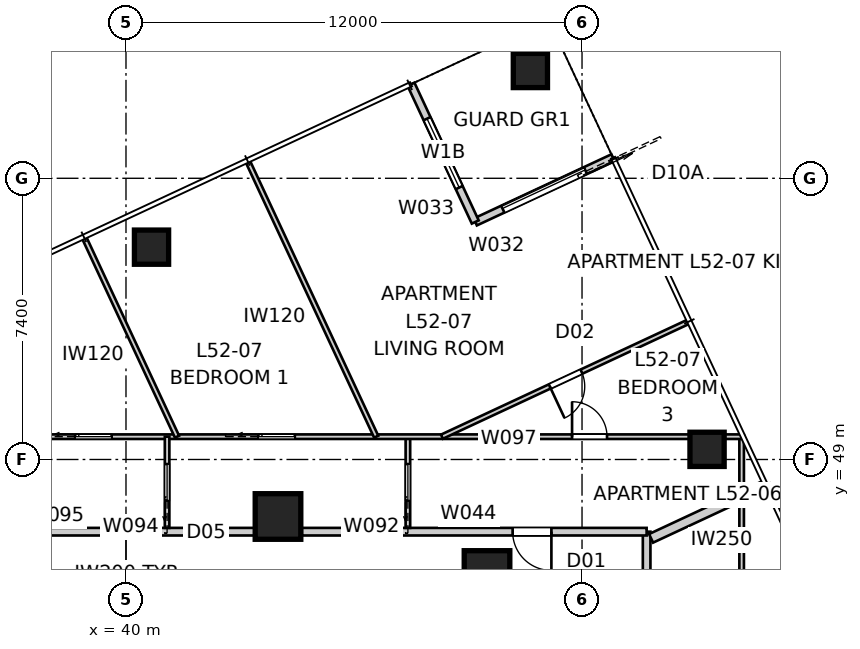
"""IFC4 building model, lengths in metres.
Left out: names, types, materials, properties, quantities, classifications, styles, units other than length and angle.
Written with IfcOpenShell. Run it as: python <this file> out.ifc"""

import sys

from ifc_helpers import new_model, si_unit, direction, frame, frame_2d, origin, origin_2d, place, context, subcontext, project, spatial, rectangle, extrude, element, fill, save


model = new_model("IFC4")
c1 = context("Model", 3, precision=1e-05, world=origin(), true_north=direction((0.0, 1.0)))
c2 = subcontext(c1, "Body", "Model", "MODEL_VIEW")
j1 = project(units=[si_unit("LENGTHUNIT", "METRE"), si_unit("PLANEANGLEUNIT", "RADIAN")], contexts=[c1])
p1 = place(None, origin())
s1 = spatial("IfcSite", under=j1, at=p1, CompositionType="ELEMENT")
p2 = place(p1, origin())
s2 = spatial("IfcBuilding", under=s1, at=p2, CompositionType="ELEMENT")
p3 = place(p2, frame((0.0, 0.0, 189.6)))
s3 = spatial("IfcBuildingStorey", under=s2, at=p3, CompositionType="ELEMENT", Elevation=189.6)
for number, where, z_axis, x_axis in (
    (1, (55.29, 49.267, 0.0), (0.0, 0.0, 1.0), (1.0, 0.0, 0.0)),
    (2, (50.641, 59.236, 0.0), (0.0, 0.0, 1.0), (1.0, 0.0, 0.0)),
    (3, (40.672, 54.588, 0.0), (0.0, 0.0, 1.0), (1.0, 0.0, 0.0)),
):
    element("IfcColumn", number, at=place(p3, frame(where, z_axis=z_axis, x_axis=x_axis)), inside=s3, PredefinedType="COLUMN", context=c2, shape_type="SweptSolid", body=[
        extrude(rectangle(XDim=0.9, YDim=0.9, at=origin_2d()), origin(), (0.0, 0.0, 1.0), 3.4),
    ])
for number, where, z_axis, x_axis in (
    (4, (49.5, 46.0, 0.0), (0.0, 0.0, 1.0), (1.0, 0.0, 0.0)),
    (5, (44.0, 47.5, 0.0), (0.0, 0.0, 1.0), (1.0, 0.0, 0.0)),
):
    element("IfcColumn", number, at=place(p3, frame(where, z_axis=z_axis, x_axis=x_axis)), inside=s3, PredefinedType="COLUMN", context=c2, shape_type="SweptSolid", body=[
        extrude(rectangle(XDim=1.2, YDim=1.2, at=origin_2d()), origin(), (0.0, 0.0, 1.0), 3.4),
    ])
p4 = place(p3, frame((52.815, 56.94, 0.0), z_axis=(0.0, 0.0, 1.0), x_axis=(-0.906289140828, -0.422658246362, 0.0)))
e6 = element("IfcWall", 6, at=p4, inside=s3, PredefinedType="SOLIDWALL", context=c2, shape_type="SweptSolid", body=[
    extrude(rectangle(XDim=4.0, YDim=0.2, at=frame_2d((2.0, 0.0))), origin(), (0.0, 0.0, 1.0), 3.25),
])
p5 = place(p4, frame((0.8, 0.0, 0.0)))
e7 = element("IfcOpeningElement", 7, at=p5, cuts=e6, PredefinedType="OPENING", context=c2, shape_type="SweptSolid", body=[
    extrude(rectangle(XDim=2.4, YDim=2.1, at=frame_2d((1.2, 1.05))), frame((0.0, 0.11, 0.0), z_axis=(0.0, -1.0, 0.0), x_axis=(1.0, 0.0, 0.0)), (0.0, 0.0, 1.0), 0.22),
])
p6 = place(p3, frame((49.19, 55.25, 0.0), z_axis=(0.0, 0.0, 1.0), x_axis=(-0.422658246362, 0.906289140828, 0.0)))
e8 = element("IfcWall", 8, at=p6, inside=s3, PredefinedType="SOLIDWALL", context=c2, shape_type="SweptSolid", body=[
    extrude(rectangle(XDim=4.0, YDim=0.2, at=frame_2d((2.0, 0.0))), origin(), (0.0, 0.0, 1.0), 3.25),
])
p7 = place(p6, frame((1.0, 0.0, 0.45)))
e9 = element("IfcOpeningElement", 9, at=p7, cuts=e8, PredefinedType="OPENING", context=c2, shape_type="SweptSolid", body=[
    extrude(rectangle(XDim=2.0, YDim=1.8, at=frame_2d((1.0, 0.9))), frame((0.0, 0.11, 0.0), z_axis=(0.0, -1.0, 0.0), x_axis=(1.0, 0.0, 0.0)), (0.0, 0.0, 1.0), 0.22),
])
p8 = place(p3, frame((53.7, 13.3, 0.0), z_axis=(0.0, 0.0, 1.0), x_axis=(0.0, 1.0, 0.0)))
e10 = element("IfcWall", 10, at=p8, inside=s3, PredefinedType="PARTITIONING", context=c2, shape_type="SweptSolid", body=[
    extrude(rectangle(XDim=33.8, YDim=0.2, at=frame_2d((16.9, 0.0))), origin(), (0.0, 0.0, 1.0), 3.25),
])
p9 = place(p8, frame((6.984, 0.0, 0.0)))
e11 = element("IfcOpeningElement", 11, at=p9, cuts=e10, PredefinedType="OPENING", context=c2, shape_type="SweptSolid", body=[
    extrude(rectangle(XDim=1.02, YDim=2.34, at=frame_2d((0.51, 1.17))), frame((0.0, 0.11, 0.0), z_axis=(0.0, -1.0, 0.0), x_axis=(1.0, 0.0, 0.0)), (0.0, 0.0, 1.0), 0.22),
])
p10 = place(p8, frame((29.648, 0.0, 0.0)))
e12 = element("IfcOpeningElement", 12, at=p10, cuts=e10, PredefinedType="OPENING", context=c2, shape_type="SweptSolid", body=[
    extrude(rectangle(XDim=1.02, YDim=2.34, at=frame_2d((0.51, 1.17))), frame((0.0, 0.11, 0.0), z_axis=(0.0, -1.0, 0.0), x_axis=(1.0, 0.0, 0.0)), (0.0, 0.0, 1.0), 0.22),
])
p11 = place(p8, frame((15.16, 0.0, 0.0)))
e13 = element("IfcOpeningElement", 13, at=p11, cuts=e10, PredefinedType="OPENING", context=c2, shape_type="SweptSolid", body=[
    extrude(rectangle(XDim=1.02, YDim=2.34, at=frame_2d((0.51, 1.17))), frame((0.0, 0.11, 0.0), z_axis=(0.0, -1.0, 0.0), x_axis=(1.0, 0.0, 0.0)), (0.0, 0.0, 1.0), 0.22),
])
p12 = place(p3, frame((53.7, 47.1, 0.0), z_axis=(0.0, 0.0, 1.0), x_axis=(-1.0, 0.0, 0.0)))
e14 = element("IfcWall", 14, at=p12, inside=s3, PredefinedType="PARTITIONING", context=c2, shape_type="SweptSolid", body=[
    extrude(rectangle(XDim=7.392, YDim=0.2, at=frame_2d((3.696, 0.0))), origin(), (0.0, 0.0, 1.0), 3.25),
])
p13 = place(p12, frame((2.506, 0.0, 0.0)))
e15 = element("IfcOpeningElement", 15, at=p13, cuts=e14, PredefinedType="OPENING", context=c2, shape_type="SweptSolid", body=[
    extrude(rectangle(XDim=1.02, YDim=2.34, at=frame_2d((0.51, 1.17))), frame((0.0, 0.11, 0.0), z_axis=(0.0, -1.0, 0.0), x_axis=(1.0, 0.0, 0.0)), (0.0, 0.0, 1.0), 0.22),
])
p14 = place(p3, frame((46.308, 47.1, 0.0), z_axis=(0.0, 0.0, 1.0), x_axis=(-1.0, 0.0, 0.0)))
e16 = element("IfcWall", 16, at=p14, inside=s3, PredefinedType="PARTITIONING", context=c2, shape_type="SweptSolid", body=[
    extrude(rectangle(XDim=1.683, YDim=0.2, at=frame_2d((0.842, 0.0))), origin(), (0.0, 0.0, 1.0), 2.55),
])
p15 = place(p3, frame((44.625, 47.1, 0.0), z_axis=(0.0, 0.0, 1.0), x_axis=(-1.0, 0.0, 0.0)))
e17 = element("IfcWall", 17, at=p15, inside=s3, PredefinedType="PARTITIONING", context=c2, shape_type="SweptSolid", body=[
    extrude(rectangle(XDim=9.25, YDim=0.2, at=frame_2d((4.625, 0.0))), origin(), (0.0, 0.0, 1.0), 3.25),
])
p16 = place(p3, frame((56.83, 48.33, 0.0), z_axis=(0.0, 0.0, 1.0), x_axis=(-0.906310647924, -0.422612126495, 0.0)))
e18 = element("IfcWall", 18, at=p16, inside=s3, PredefinedType="PARTITIONING", context=c2, shape_type="SweptSolid", body=[
    extrude(rectangle(XDim=3.325, YDim=0.25, at=frame_2d((1.663, 0.0))), origin(), (0.0, 0.0, 1.0), 3.25),
])
p17 = place(p3, frame((56.2, 49.642, 0.0), z_axis=(0.0, 0.0, 1.0), x_axis=(0.0, -1.0, 0.0)))
e19 = element("IfcWall", 19, at=p17, inside=s3, PredefinedType="PARTITIONING", context=c2, shape_type="SweptSolid", body=[
    extrude(rectangle(XDim=37.421, YDim=0.12, at=frame_2d((18.71, 0.0))), origin(), (0.0, 0.0, 1.0), 2.55),
])
p18 = place(p17, frame((27.488, 0.0, 0.0)))
e20 = element("IfcOpeningElement", 20, at=p18, cuts=e19, PredefinedType="OPENING", context=c2, shape_type="SweptSolid", body=[
    extrude(rectangle(XDim=0.92, YDim=2.34, at=frame_2d((0.46, 1.17))), frame((0.0, 0.07, 0.0), z_axis=(0.0, -1.0, 0.0), x_axis=(1.0, 0.0, 0.0)), (0.0, 0.0, 1.0), 0.14),
])
p19 = place(p17, frame((5.08, 0.0, 0.0)))
e21 = element("IfcOpeningElement", 21, at=p19, cuts=e19, PredefinedType="OPENING", context=c2, shape_type="SweptSolid", body=[
    extrude(rectangle(XDim=0.92, YDim=2.34, at=frame_2d((0.46, 1.17))), frame((0.0, 0.07, 0.0), z_axis=(0.0, -1.0, 0.0), x_axis=(1.0, 0.0, 0.0)), (0.0, 0.0, 1.0), 0.14),
])
p20 = place(p17, frame((19.592, 0.0, 0.0)))
e22 = element("IfcOpeningElement", 22, at=p20, cuts=e19, PredefinedType="OPENING", context=c2, shape_type="SweptSolid", body=[
    extrude(rectangle(XDim=0.92, YDim=2.34, at=frame_2d((0.46, 1.17))), frame((0.0, 0.07, 0.0), z_axis=(0.0, -1.0, 0.0), x_axis=(1.0, 0.0, 0.0)), (0.0, 0.0, 1.0), 0.14),
])
p21 = place(p3, frame((47.418, 47.2, 0.0), z_axis=(0.0, 0.0, 1.0), x_axis=(0.0, 1.0, 0.0)))
e23 = element("IfcWall", 23, at=p21, inside=s3, PredefinedType="PARTITIONING", context=c2, shape_type="SweptSolid", body=[
    extrude(rectangle(XDim=2.4, YDim=0.12, at=frame_2d((1.2, 0.0))), origin(), (0.0, 0.0, 1.0), 3.25),
])
p22 = place(p21, frame((0.72, 0.0, 0.0)))
e24 = element("IfcOpeningElement", 24, at=p22, cuts=e23, PredefinedType="OPENING", context=c2, shape_type="SweptSolid", body=[
    extrude(rectangle(XDim=0.96, YDim=2.1, at=frame_2d((0.48, 1.05))), frame((0.0, 0.07, 0.0), z_axis=(0.0, -1.0, 0.0), x_axis=(1.0, 0.0, 0.0)), (0.0, 0.0, 1.0), 0.14),
])
p23 = place(p3, frame((30.86, 49.6, 0.0), z_axis=(0.0, 0.0, 1.0), x_axis=(1.0, 0.0, 0.0)))
e25 = element("IfcWall", 25, at=p23, inside=s3, PredefinedType="PARTITIONING", context=c2, shape_type="SweptSolid", body=[
    extrude(rectangle(XDim=25.333, YDim=0.12, at=frame_2d((12.667, 0.0))), origin(), (0.0, 0.0, 1.0), 3.25),
])
p24 = place(p23, frame((20.877, 0.0, 0.0)))
e26 = element("IfcOpeningElement", 26, at=p24, cuts=e25, PredefinedType="OPENING", context=c2, shape_type="SweptSolid", body=[
    extrude(rectangle(XDim=0.92, YDim=2.34, at=frame_2d((0.46, 1.17))), frame((0.0, 0.07, 0.0), z_axis=(0.0, -1.0, 0.0), x_axis=(1.0, 0.0, 0.0)), (0.0, 0.0, 1.0), 0.14),
])
p25 = place(p23, frame((12.623, 0.0, 0.0)))
e27 = element("IfcOpeningElement", 27, at=p25, cuts=e25, PredefinedType="OPENING", context=c2, shape_type="SweptSolid", body=[
    extrude(rectangle(XDim=0.96, YDim=2.1, at=frame_2d((0.48, 1.05))), frame((0.0, 0.07, 0.0), z_axis=(0.0, -1.0, 0.0), x_axis=(1.0, 0.0, 0.0)), (0.0, 0.0, 1.0), 0.14),
])
p26 = place(p23, frame((7.802, 0.0, 0.0)))
e28 = element("IfcOpeningElement", 28, at=p26, cuts=e25, PredefinedType="OPENING", context=c2, shape_type="SweptSolid", body=[
    extrude(rectangle(XDim=0.96, YDim=2.1, at=frame_2d((0.48, 1.05))), frame((0.0, 0.07, 0.0), z_axis=(0.0, -1.0, 0.0), x_axis=(1.0, 0.0, 0.0)), (0.0, 0.0, 1.0), 0.14),
])
p27 = place(p23, frame((2.168, 0.0, 0.0)))
e29 = element("IfcOpeningElement", 29, at=p27, cuts=e25, PredefinedType="OPENING", context=c2, shape_type="SweptSolid", body=[
    extrude(rectangle(XDim=0.96, YDim=2.1, at=frame_2d((0.48, 1.05))), frame((0.0, 0.07, 0.0), z_axis=(0.0, -1.0, 0.0), x_axis=(1.0, 0.0, 0.0)), (0.0, 0.0, 1.0), 0.14),
])
p28 = place(p3, frame((41.082, 47.2, 0.0), z_axis=(0.0, 0.0, 1.0), x_axis=(0.0, 1.0, 0.0)))
e30 = element("IfcWall", 30, at=p28, inside=s3, PredefinedType="PARTITIONING", context=c2, shape_type="SweptSolid", body=[
    extrude(rectangle(XDim=2.4, YDim=0.12, at=frame_2d((1.2, 0.0))), origin(), (0.0, 0.0, 1.0), 3.25),
])
p29 = place(p28, frame((0.72, 0.0, 0.0)))
e31 = element("IfcOpeningElement", 31, at=p29, cuts=e30, PredefinedType="OPENING", context=c2, shape_type="SweptSolid", body=[
    extrude(rectangle(XDim=0.96, YDim=2.1, at=frame_2d((0.48, 1.05))), frame((0.0, 0.07, 0.0), z_axis=(0.0, -1.0, 0.0), x_axis=(1.0, 0.0, 0.0)), (0.0, 0.0, 1.0), 0.14),
])
p30 = place(p3, frame((46.583, 49.6, 0.0), z_axis=(0.0, 0.0, 1.0), x_axis=(-0.422640876946, 0.90629724105, 0.0)))
e32 = element("IfcWall", 32, at=p30, inside=s3, PredefinedType="PARTITIONING", context=c2, shape_type="SweptSolid", body=[
    extrude(rectangle(XDim=7.979, YDim=0.12, at=frame_2d((3.989, 0.0))), origin(), (0.0, 0.0, 1.0), 3.25),
])
p31 = place(p3, frame((54.787, 52.618, 0.0), z_axis=(0.0, 0.0, 1.0), x_axis=(-0.906317589158, -0.422597240388, 0.0)))
e33 = element("IfcWall", 33, at=p31, inside=s3, PredefinedType="PARTITIONING", context=c2, shape_type="SweptSolid", body=[
    extrude(rectangle(XDim=7.142, YDim=0.12, at=frame_2d((3.571, 0.0))), origin(), (0.0, 0.0, 1.0), 3.25),
])
p32 = place(p31, frame((3.091, 0.0, 0.0)))
e34 = element("IfcOpeningElement", 34, at=p32, cuts=e33, PredefinedType="OPENING", context=c2, shape_type="SweptSolid", body=[
    extrude(rectangle(XDim=0.92, YDim=2.34, at=frame_2d((0.46, 1.17))), frame((0.0, 0.07, 0.0), z_axis=(0.0, -1.0, 0.0), x_axis=(1.0, 0.0, 0.0)), (0.0, 0.0, 1.0), 0.14),
])
p33 = place(p3, frame((41.343, 49.6, 0.0), z_axis=(0.0, 0.0, 1.0), x_axis=(-0.422648925879, 0.906293487483, 0.0)))
e35 = element("IfcWall", 35, at=p33, inside=s3, PredefinedType="PARTITIONING", context=c2, shape_type="SweptSolid", body=[
    extrude(rectangle(XDim=5.764, YDim=0.12, at=frame_2d((2.882, 0.0))), origin(), (0.0, 0.0, 1.0), 3.25),
])
p34 = place(p5, origin())
e36 = element("IfcDoor", 36, at=p34, inside=s3, OperationType="SLIDING_TO_LEFT", PredefinedType="DOOR", context=c2, shape_type="SweptSolid", body=[
    extrude(rectangle(XDim=2.4, YDim=2.1, at=frame_2d((1.2, 1.05))), frame((0.0, 0.025, 0.0), z_axis=(0.0, -1.0, 0.0), x_axis=(1.0, 0.0, 0.0)), (0.0, 0.0, 1.0), 0.05),
])
fill(e7, e36)
p35 = place(p7, origin())
e37 = element("IfcWindow", 37, at=p35, inside=s3, PartitioningType="SINGLE_PANEL", PredefinedType="WINDOW", context=c2, shape_type="SweptSolid", body=[
    extrude(rectangle(XDim=2.0, YDim=1.8, at=frame_2d((1.0, 0.9))), frame((0.0, 0.03, 0.0), z_axis=(0.0, -1.0, 0.0), x_axis=(1.0, 0.0, 0.0)), (0.0, 0.0, 1.0), 0.06),
])
fill(e9, e37)
p36 = place(p13, origin())
e38 = element("IfcDoor", 38, at=p36, inside=s3, OperationType="SINGLE_SWING_LEFT", PredefinedType="DOOR", context=c2, shape_type="SweptSolid", body=[
    extrude(rectangle(XDim=1.02, YDim=2.34, at=frame_2d((0.51, 1.17))), frame((0.0, 0.025, 0.0), z_axis=(0.0, -1.0, 0.0), x_axis=(1.0, 0.0, 0.0)), (0.0, 0.0, 1.0), 0.05),
])
fill(e15, e38)
p37 = place(p24, origin())
e39 = element("IfcDoor", 39, at=p37, inside=s3, OperationType="SINGLE_SWING_LEFT", PredefinedType="DOOR", context=c2, shape_type="SweptSolid", body=[
    extrude(rectangle(XDim=0.92, YDim=2.34, at=frame_2d((0.46, 1.17))), frame((0.0, 0.025, 0.0), z_axis=(0.0, -1.0, 0.0), x_axis=(1.0, 0.0, 0.0)), (0.0, 0.0, 1.0), 0.05),
])
fill(e26, e39)
p38 = place(p22, origin())
e40 = element("IfcDoor", 40, at=p38, inside=s3, OperationType="SLIDING_TO_LEFT", PredefinedType="DOOR", context=c2, shape_type="SweptSolid", body=[
    extrude(rectangle(XDim=0.96, YDim=2.1, at=frame_2d((0.48, 1.05))), frame((0.0, 0.025, 0.0), z_axis=(0.0, -1.0, 0.0), x_axis=(1.0, 0.0, 0.0)), (0.0, 0.0, 1.0), 0.05),
])
fill(e24, e40)
p39 = place(p25, origin())
e41 = element("IfcDoor", 41, at=p39, inside=s3, OperationType="SLIDING_TO_LEFT", PredefinedType="DOOR", context=c2, shape_type="SweptSolid", body=[
    extrude(rectangle(XDim=0.96, YDim=2.1, at=frame_2d((0.48, 1.05))), frame((0.0, 0.025, 0.0), z_axis=(0.0, -1.0, 0.0), x_axis=(1.0, 0.0, 0.0)), (0.0, 0.0, 1.0), 0.05),
])
fill(e27, e41)
p40 = place(p29, origin())
e42 = element("IfcDoor", 42, at=p40, inside=s3, OperationType="SLIDING_TO_LEFT", PredefinedType="DOOR", context=c2, shape_type="SweptSolid", body=[
    extrude(rectangle(XDim=0.96, YDim=2.1, at=frame_2d((0.48, 1.05))), frame((0.0, 0.025, 0.0), z_axis=(0.0, -1.0, 0.0), x_axis=(1.0, 0.0, 0.0)), (0.0, 0.0, 1.0), 0.05),
])
fill(e31, e42)
p41 = place(p26, origin())
e43 = element("IfcDoor", 43, at=p41, inside=s3, OperationType="SLIDING_TO_LEFT", PredefinedType="DOOR", context=c2, shape_type="SweptSolid", body=[
    extrude(rectangle(XDim=0.96, YDim=2.1, at=frame_2d((0.48, 1.05))), frame((0.0, 0.025, 0.0), z_axis=(0.0, -1.0, 0.0), x_axis=(1.0, 0.0, 0.0)), (0.0, 0.0, 1.0), 0.05),
])
fill(e28, e43)
p42 = place(p32, origin())
e44 = element("IfcDoor", 44, at=p42, inside=s3, OperationType="SINGLE_SWING_RIGHT", PredefinedType="DOOR", context=c2, shape_type="SweptSolid", body=[
    extrude(rectangle(XDim=0.92, YDim=2.34, at=frame_2d((0.46, 1.17))), frame((0.0, 0.025, 0.0), z_axis=(0.0, -1.0, 0.0), x_axis=(1.0, 0.0, 0.0)), (0.0, 0.0, 1.0), 0.05),
])
fill(e34, e44)
save(model, sys.argv[1])
